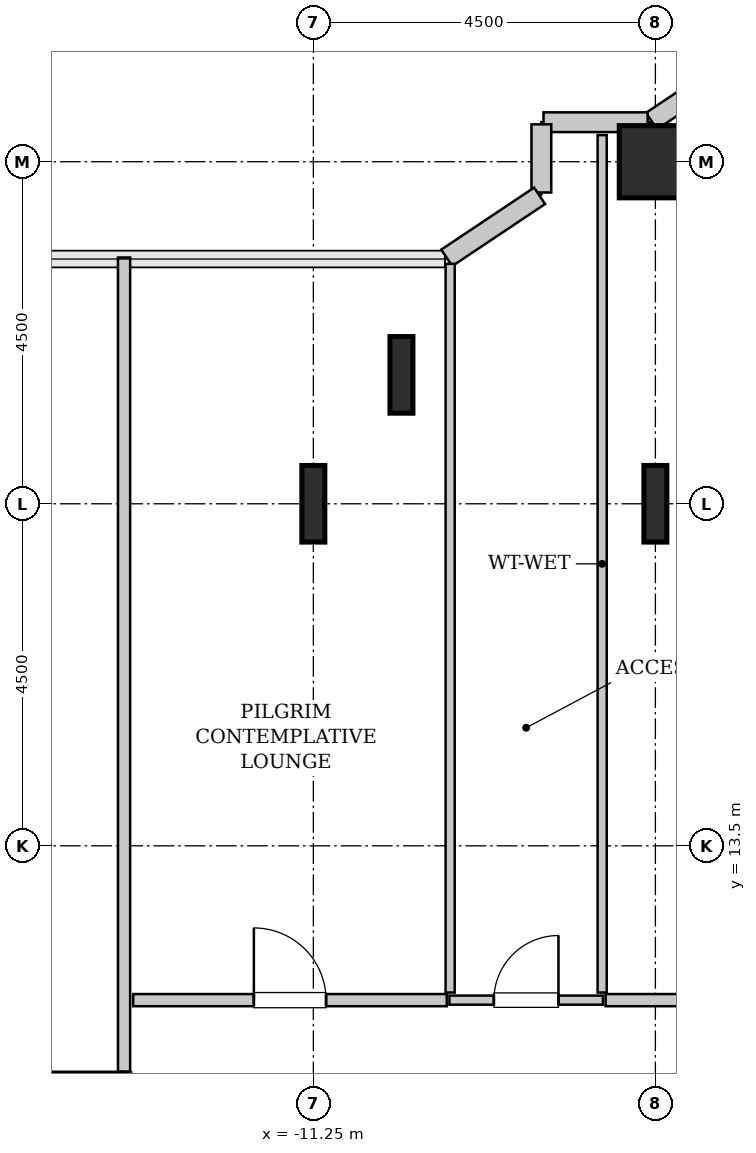
"""IFC4 building model, lengths in metres.
Left out: names, types, materials, properties, quantities, classifications, styles, units other than length and angle.
Written with IfcOpenShell. Run it as: python <this file> out.ifc"""

import sys

from ifc_helpers import new_model, si_unit, direction, frame, frame_2d, origin, origin_2d, place, context, subcontext, project, spatial, rectangle, hollow_rectangle, i_section, extrude, source, transform, mapped, element, fill, save


model = new_model("IFC4")
c1 = context("Model", 3, precision=1e-05, world=origin(), true_north=direction((0.0, 1.0)))
c2 = subcontext(c1, "Body", "Model", "MODEL_VIEW")
j1 = project(units=[si_unit("LENGTHUNIT", "METRE"), si_unit("PLANEANGLEUNIT", "RADIAN")], contexts=[c1])
p1 = place(None, origin())
s1 = spatial("IfcSite", under=j1, at=p1, CompositionType="ELEMENT")
p2 = place(p1, origin())
s2 = spatial("IfcBuilding", under=s1, at=p2, CompositionType="ELEMENT")
p3 = place(p2, frame((0.0, 0.0, 74.8)))
s3 = spatial("IfcBuildingStorey", under=s2, at=p3, CompositionType="ELEMENT", Elevation=74.8)
m1 = source(origin(), c2, "Body", "SweptSolid", [
    extrude(i_section(OverallWidth=0.302, OverallDepth=1.008, WebThickness=0.021, FlangeThickness=0.04, FilletRadius=0.03, at=origin_2d()), origin(), (0.0, 0.0, 1.0), 3.8),
])
for number, where, z_axis, x_axis in (
    (1, (-11.25, 18.0, 0.0), (0.0, 0.0, 1.0), (1.0, 0.0, 0.0)),
    (2, (-10.091, 19.696, 0.0), (0.0, 0.0, 1.0), (1.0, 0.0, 0.0)),
    (3, (-6.75, 18.0, 0.0), (0.0, 0.0, 1.0), (1.0, 0.0, 0.0)),
):
    element("IfcColumn", number, at=place(p3, frame(where, z_axis=z_axis, x_axis=x_axis)), inside=s3, PredefinedType="COLUMN", context=c2, shape_type="MappedRepresentation", body=[
        mapped(m1, transform((0.0, 0.0, 0.0), x_axis=(1.0, 0.0, 0.0), y_axis=(0.0, 1.0, 0.0), z_axis=(0.0, 0.0, 1.0), scale=1.0)),
    ])
m2 = source(origin(), c2, "Body", "SweptSolid", [
    extrude(hollow_rectangle(XDim=0.95, YDim=0.95, WallThickness=0.045, InnerFilletRadius=0.045, OuterFilletRadius=0.09, at=origin_2d()), origin(), (0.0, 0.0, 1.0), 3.8),
])
p4 = place(p3, frame((-6.75, 22.5, 0.0), z_axis=(0.0, 0.0, 1.0), x_axis=(1.0, 0.0, 0.0)))
e4 = element("IfcColumn", 4, at=p4, inside=s3, PredefinedType="COLUMN", context=c2, shape_type="MappedRepresentation", body=[
    mapped(m2, transform((0.0, 0.0, 0.0), x_axis=(1.0, 0.0, 0.0), y_axis=(0.0, 1.0, 0.0), z_axis=(0.0, 0.0, 1.0), scale=1.0)),
])
m3 = source(origin(), c2, "Body", "SweptSolid", [
    extrude(rectangle(XDim=0.565, YDim=0.26, at=frame_2d((0.283, 0.0))), origin(), (0.0, 0.0, 1.0), 3.55),
])
p5 = place(p3, frame((-6.331, 23.35, 0.0), z_axis=(0.0, 0.0, 1.0), x_axis=(-0.831651492666, -0.555297933317, 0.0)))
e5 = element("IfcWall", 5, at=p5, inside=s3, PredefinedType="SOLIDWALL", context=c2, shape_type="MappedRepresentation", body=[
    mapped(m3, transform((0.0, 0.0, 0.0), x_axis=(1.0, 0.0, 0.0), y_axis=(0.0, 1.0, 0.0), z_axis=(0.0, 0.0, 1.0), scale=1.0)),
])
m4 = source(origin(), c2, "Body", "SweptSolid", [
    extrude(rectangle(XDim=1.37, YDim=0.26, at=frame_2d((0.685, 0.0))), origin(), (0.0, 0.0, 1.0), 3.55),
])
p6 = place(p3, frame((-6.852, 23.02, 0.0), z_axis=(0.0, 0.0, 1.0), x_axis=(-1.0, 0.0, 0.0)))
e6 = element("IfcWall", 6, at=p6, inside=s3, PredefinedType="SOLIDWALL", context=c2, shape_type="MappedRepresentation", body=[
    mapped(m4, transform((0.0, 0.0, 0.0), x_axis=(1.0, 0.0, 0.0), y_axis=(0.0, 1.0, 0.0), z_axis=(0.0, 0.0, 1.0), scale=1.0)),
])
m5 = source(origin(), c2, "Body", "SweptSolid", [
    extrude(rectangle(XDim=0.897, YDim=0.26, at=frame_2d((0.448, 0.0))), origin(), (0.0, 0.0, 1.0), 3.55),
])
p7 = place(p3, frame((-8.25, 22.992, 0.0), z_axis=(0.0, 0.0, 1.0), x_axis=(0.0, -1.0, 0.0)))
e7 = element("IfcWall", 7, at=p7, inside=s3, PredefinedType="SOLIDWALL", context=c2, shape_type="MappedRepresentation", body=[
    mapped(m5, transform((0.0, 0.0, 0.0), x_axis=(1.0, 0.0, 0.0), y_axis=(0.0, 1.0, 0.0), z_axis=(0.0, 0.0, 1.0), scale=1.0)),
])
m6 = source(origin(), c2, "Body", "SweptSolid", [
    extrude(rectangle(XDim=1.469, YDim=0.26, at=frame_2d((0.734, 0.0))), origin(), (0.0, 0.0, 1.0), 3.55),
])
p8 = place(p3, frame((-8.273, 22.052, 0.0), z_axis=(0.0, 0.0, 1.0), x_axis=(-0.831461760506, -0.555581983884, 0.0)))
e8 = element("IfcWall", 8, at=p8, inside=s3, PredefinedType="SOLIDWALL", context=c2, shape_type="MappedRepresentation", body=[
    mapped(m6, transform((0.0, 0.0, 0.0), x_axis=(1.0, 0.0, 0.0), y_axis=(0.0, 1.0, 0.0), z_axis=(0.0, 0.0, 1.0), scale=1.0)),
])
m7 = source(origin(), c2, "Body", "SweptSolid", [
    extrude(rectangle(XDim=2.02, YDim=0.12, at=frame_2d((1.01, 0.0))), origin(), (0.0, 0.0, 1.0), 3.535),
])
p9 = place(p3, frame((-9.46, 11.47, 0.0), z_axis=(0.0, 0.0, 1.0), x_axis=(1.0, 0.0, 0.0)))
e9 = element("IfcWall", 9, at=p9, inside=s3, PredefinedType="PLUMBINGWALL", context=c2, shape_type="MappedRepresentation", body=[
    mapped(m7, transform((0.0, 0.0, 0.0), x_axis=(1.0, 0.0, 0.0), y_axis=(0.0, 1.0, 0.0), z_axis=(0.0, 0.0, 1.0), scale=1.0)),
])
p10 = place(p9, frame((0.585, 0.0, 0.0)))
e10 = element("IfcOpeningElement", 10, at=p10, cuts=e9, PredefinedType="OPENING", context=c2, shape_type="SweptSolid", body=[
    extrude(rectangle(XDim=0.85, YDim=2.1, at=frame_2d((0.425, 1.05))), frame((0.0, 0.07, 0.0), z_axis=(0.0, -1.0, 0.0), x_axis=(1.0, 0.0, 0.0)), (0.0, 0.0, 1.0), 0.14),
])
m8 = source(origin(), c2, "Body", "SweptSolid", [
    extrude(rectangle(XDim=11.28, YDim=0.12, at=frame_2d((5.64, 0.0))), origin(), (0.0, 0.0, 1.0), 3.535),
])
p11 = place(p3, frame((-7.45, 11.57, 0.0), z_axis=(0.0, 0.0, 1.0), x_axis=(0.0, 1.0, 0.0)))
e11 = element("IfcWall", 11, at=p11, inside=s3, PredefinedType="PLUMBINGWALL", context=c2, shape_type="MappedRepresentation", body=[
    mapped(m8, transform((0.0, 0.0, 0.0), x_axis=(1.0, 0.0, 0.0), y_axis=(0.0, 1.0, 0.0), z_axis=(0.0, 0.0, 1.0), scale=1.0)),
])
m9 = source(origin(), c2, "Body", "SweptSolid", [
    extrude(rectangle(XDim=9.587, YDim=0.12, at=frame_2d((4.793, 0.0))), origin(), (0.0, 0.0, 1.0), 3.535),
])
p12 = place(p3, frame((-9.45, 11.57, 0.0), z_axis=(0.0, 0.0, 1.0), x_axis=(0.0, 1.0, 0.0)))
e12 = element("IfcWall", 12, at=p12, inside=s3, PredefinedType="PLUMBINGWALL", context=c2, shape_type="MappedRepresentation", body=[
    mapped(m9, transform((0.0, 0.0, 0.0), x_axis=(1.0, 0.0, 0.0), y_axis=(0.0, 1.0, 0.0), z_axis=(0.0, 0.0, 1.0), scale=1.0)),
])
m10 = source(origin(), c2, "Body", "SweptSolid", [
    extrude(rectangle(XDim=12.645, YDim=0.16, at=frame_2d((6.323, 0.0))), origin(), (0.0, 0.0, 1.0), 3.535),
])
p13 = place(p3, frame((-13.74, 8.595, 0.0), z_axis=(0.0, 0.0, 1.0), x_axis=(0.0, 1.0, 0.0)))
e13 = element("IfcWall", 13, at=p13, inside=s3, PredefinedType="PARTITIONING", context=c2, shape_type="MappedRepresentation", body=[
    mapped(m10, transform((0.0, 0.0, 0.0), x_axis=(1.0, 0.0, 0.0), y_axis=(0.0, 1.0, 0.0), z_axis=(0.0, 0.0, 1.0), scale=1.0)),
])
p14 = place(p13, frame((0.982, 0.0, 0.0)))
e14 = element("IfcOpeningElement", 14, at=p14, cuts=e13, PredefinedType="OPENING", context=c2, shape_type="SweptSolid", body=[
    extrude(rectangle(XDim=0.95, YDim=2.1, at=frame_2d((0.475, 1.05))), frame((0.0, 0.09, 0.0), z_axis=(0.0, -1.0, 0.0), x_axis=(1.0, 0.0, 0.0)), (0.0, 0.0, 1.0), 0.18),
])
m11 = source(origin(), c2, "Body", "SweptSolid", [
    extrude(rectangle(XDim=4.125, YDim=0.16, at=frame_2d((2.062, 0.0))), origin(), (0.0, 0.0, 1.0), 3.535),
])
p15 = place(p3, frame((-13.62, 11.47, 0.0), z_axis=(0.0, 0.0, 1.0), x_axis=(1.0, 0.0, 0.0)))
e15 = element("IfcWall", 15, at=p15, inside=s3, PredefinedType="PARTITIONING", context=c2, shape_type="MappedRepresentation", body=[
    mapped(m11, transform((0.0, 0.0, 0.0), x_axis=(1.0, 0.0, 0.0), y_axis=(0.0, 1.0, 0.0), z_axis=(0.0, 0.0, 1.0), scale=1.0)),
])
p16 = place(p15, frame((1.587, 0.0, 0.0)))
e16 = element("IfcOpeningElement", 16, at=p16, cuts=e15, PredefinedType="OPENING", context=c2, shape_type="SweptSolid", body=[
    extrude(rectangle(XDim=0.95, YDim=2.1, at=frame_2d((0.475, 1.05))), frame((0.0, 0.09, 0.0), z_axis=(0.0, -1.0, 0.0), x_axis=(1.0, 0.0, 0.0)), (0.0, 0.0, 1.0), 0.18),
])
m12 = source(origin(), c2, "Body", "SweptSolid", [
    extrude(rectangle(XDim=4.605, YDim=0.16, at=frame_2d((2.302, 0.0))), origin(), (0.0, 0.0, 1.0), 3.535),
])
p17 = place(p3, frame((-7.405, 11.47, 0.0), z_axis=(0.0, 0.0, 1.0), x_axis=(1.0, 0.0, 0.0)))
e17 = element("IfcWall", 17, at=p17, inside=s3, PredefinedType="PARTITIONING", context=c2, shape_type="MappedRepresentation", body=[
    mapped(m12, transform((0.0, 0.0, 0.0), x_axis=(1.0, 0.0, 0.0), y_axis=(0.0, 1.0, 0.0), z_axis=(0.0, 0.0, 1.0), scale=1.0)),
])
p18 = place(p17, frame((1.827, 0.0, 0.0)))
e18 = element("IfcOpeningElement", 18, at=p18, cuts=e17, PredefinedType="OPENING", context=c2, shape_type="SweptSolid", body=[
    extrude(rectangle(XDim=0.95, YDim=2.1, at=frame_2d((0.475, 1.05))), frame((0.0, 0.09, 0.0), z_axis=(0.0, -1.0, 0.0), x_axis=(1.0, 0.0, 0.0)), (0.0, 0.0, 1.0), 0.18),
])
m13 = source(origin(), c2, "Body", "SweptSolid", [
    extrude(rectangle(XDim=0.85, YDim=2.1, at=frame_2d((0.425, 1.05))), frame((0.0, 0.025, 0.0), z_axis=(0.0, -1.0, 0.0), x_axis=(1.0, 0.0, 0.0)), (0.0, 0.0, 1.0), 0.05),
])
p19 = place(p10, origin())
e19 = element("IfcDoor", 19, at=p19, inside=s3, OperationType="SINGLE_SWING_RIGHT", PredefinedType="DOOR", context=c2, shape_type="MappedRepresentation", body=[
    mapped(m13, transform((0.0, 0.0, 0.0), x_axis=(1.0, 0.0, 0.0), y_axis=(0.0, 1.0, 0.0), z_axis=(0.0, 0.0, 1.0), scale=1.0)),
])
fill(e10, e19)
m14 = source(origin(), c2, "Body", "SweptSolid", [
    extrude(rectangle(XDim=0.95, YDim=2.1, at=frame_2d((0.475, 1.05))), frame((0.0, 0.025, 0.0), z_axis=(0.0, -1.0, 0.0), x_axis=(1.0, 0.0, 0.0)), (0.0, 0.0, 1.0), 0.05),
])
p20 = place(p14, origin())
e20 = element("IfcDoor", 20, at=p20, inside=s3, OperationType="SINGLE_SWING_RIGHT", PredefinedType="DOOR", context=c2, shape_type="MappedRepresentation", body=[
    mapped(m14, transform((0.0, 0.0, 0.0), x_axis=(1.0, 0.0, 0.0), y_axis=(0.0, 1.0, 0.0), z_axis=(0.0, 0.0, 1.0), scale=1.0)),
])
fill(e14, e20)
p21 = place(p16, origin())
e21 = element("IfcDoor", 21, at=p21, inside=s3, OperationType="SINGLE_SWING_LEFT", PredefinedType="DOOR", context=c2, shape_type="MappedRepresentation", body=[
    mapped(m14, transform((0.0, 0.0, 0.0), x_axis=(1.0, 0.0, 0.0), y_axis=(0.0, 1.0, 0.0), z_axis=(0.0, 0.0, 1.0), scale=1.0)),
])
fill(e16, e21)
save(model, sys.argv[1])
